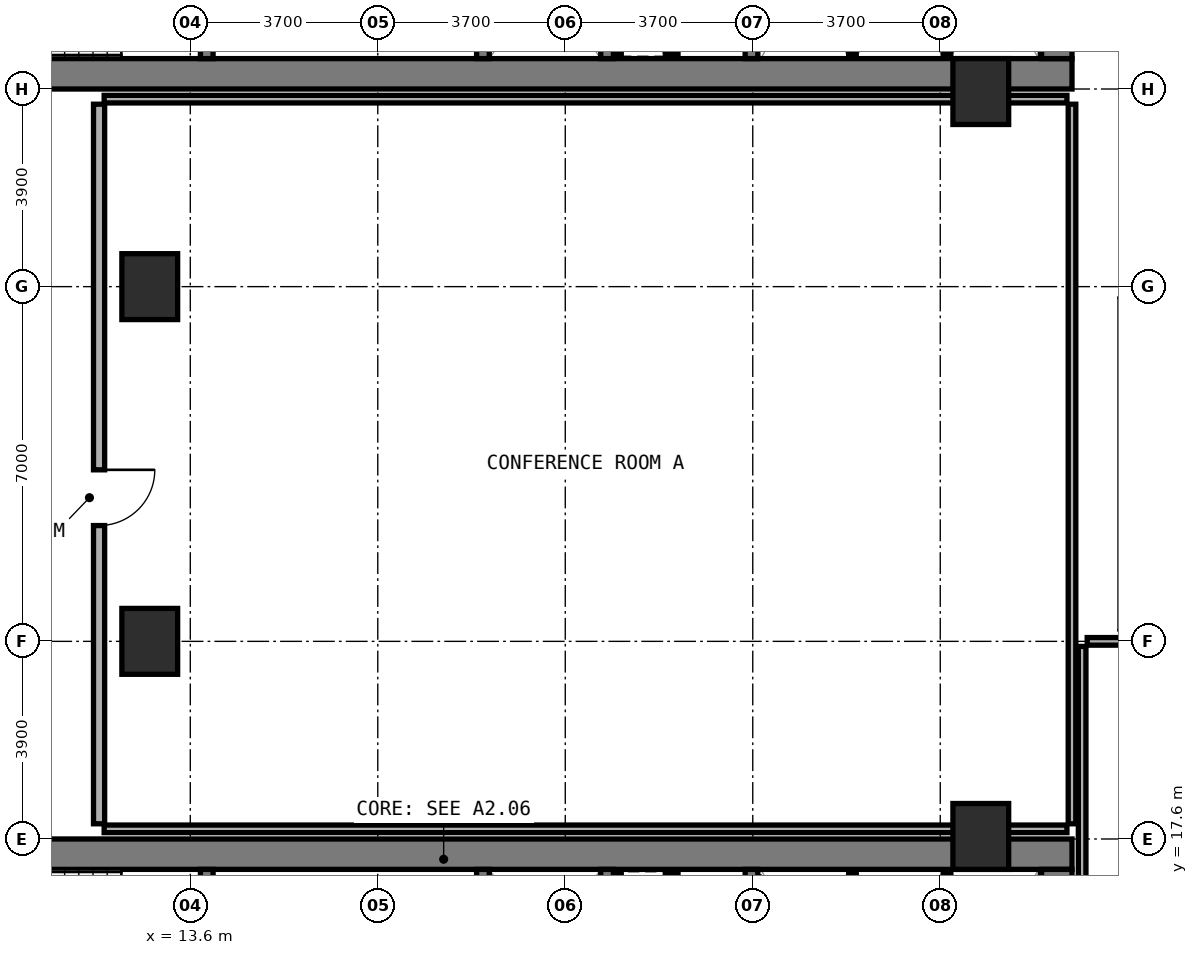
"""IFC4 building model, lengths in metres.
Left out: names, types, materials, properties, quantities, classifications, styles, units other than length and angle.
Written with IfcOpenShell. Run it as: python <this file> out.ifc"""

import sys

from ifc_helpers import new_model, si_unit, direction, frame, frame_2d, origin, origin_2d, place, context, subcontext, project, spatial, rectangle, extrude, element, fill, save


model = new_model("IFC4")
c1 = context("Model", 3, precision=1e-05, world=origin(), true_north=direction((0.0, 1.0)))
c2 = subcontext(c1, "Body", "Model", "MODEL_VIEW")
j1 = project(units=[si_unit("LENGTHUNIT", "METRE"), si_unit("PLANEANGLEUNIT", "RADIAN")], contexts=[c1])
p1 = place(None, origin())
s1 = spatial("IfcSite", under=j1, at=p1, CompositionType="ELEMENT")
p2 = place(p1, origin())
s2 = spatial("IfcBuilding", under=s1, at=p2, CompositionType="ELEMENT")
p3 = place(p2, frame((0.0, 0.0, 15.0)))
s3 = spatial("IfcBuildingStorey", under=s2, at=p3, CompositionType="ELEMENT", Elevation=15.0)
p4 = place(p3, frame((6.2, 32.7, 0.0), z_axis=(0.0, 0.0, 1.0), x_axis=(1.0, 0.0, 0.0)))
e1 = element("IfcWall", 1, at=p4, inside=s3, PredefinedType="SHEAR", context=c2, shape_type="SweptSolid", body=[
    extrude(rectangle(XDim=24.8, YDim=0.6, at=frame_2d((12.4, 0.0))), origin(), (0.0, 0.0, 1.0), 4.5),
])
p5 = place(p3, frame((30.7, 33.0, 0.0), z_axis=(0.0, 0.0, 1.0), x_axis=(0.0, 1.0, 0.0)))
e2 = element("IfcWall", 2, at=p5, inside=s3, PredefinedType="SHEAR", context=c2, shape_type="SweptSolid", body=[
    extrude(rectangle(XDim=3.16, YDim=0.6, at=frame_2d((1.58, 0.0))), origin(), (0.0, 0.0, 1.0), 4.5),
])
p6 = place(p3, frame((13.925, 33.0, 0.0), z_axis=(0.0, 0.0, 1.0), x_axis=(0.0, 1.0, 0.0)))
e3 = element("IfcWall", 3, at=p6, inside=s3, PredefinedType="STANDARD", context=c2, shape_type="SweptSolid", body=[
    extrude(rectangle(XDim=3.16, YDim=0.25, at=frame_2d((1.58, 0.0))), origin(), (0.0, 0.0, 1.0), 4.1),
])
p7 = place(p6, frame((0.98, 0.0, 0.0)))
e4 = element("IfcOpeningElement", 4, at=p7, cuts=e3, PredefinedType="OPENING", context=c2, shape_type="SweptSolid", body=[
    extrude(rectangle(XDim=1.1, YDim=2.15, at=frame_2d((0.55, 1.075))), frame((0.0, 0.135, 0.0), z_axis=(0.0, -1.0, 0.0), x_axis=(1.0, 0.0, 0.0)), (0.0, 0.0, 1.0), 0.27),
])
p8 = place(p3, frame((19.375, 33.0, 0.0), z_axis=(0.0, 0.0, 1.0), x_axis=(0.0, 1.0, 0.0)))
e5 = element("IfcWall", 5, at=p8, inside=s3, PredefinedType="STANDARD", context=c2, shape_type="SweptSolid", body=[
    extrude(rectangle(XDim=3.16, YDim=0.25, at=frame_2d((1.58, 0.0))), origin(), (0.0, 0.0, 1.0), 4.1),
])
p9 = place(p8, frame((0.98, 0.0, 0.0)))
e6 = element("IfcOpeningElement", 6, at=p9, cuts=e5, PredefinedType="OPENING", context=c2, shape_type="SweptSolid", body=[
    extrude(rectangle(XDim=1.1, YDim=2.15, at=frame_2d((0.55, 1.075))), frame((0.0, 0.135, 0.0), z_axis=(0.0, -1.0, 0.0), x_axis=(1.0, 0.0, 0.0)), (0.0, 0.0, 1.0), 0.27),
])
for number, where, z_axis, x_axis in (
    (7, (21.825, 33.0, 0.0), (0.0, 0.0, 1.0), (0.0, 1.0, 0.0)),
    (8, (24.675, 33.0, 0.0), (0.0, 0.0, 1.0), (0.0, 1.0, 0.0)),
):
    element("IfcWall", number, at=place(p3, frame(where, z_axis=z_axis, x_axis=x_axis)), inside=s3, PredefinedType="STANDARD", context=c2, shape_type="SweptSolid", body=[
        extrude(rectangle(XDim=3.16, YDim=0.25, at=frame_2d((1.58, 0.0))), origin(), (0.0, 0.0, 1.0), 4.1),
    ])
p10 = place(p3, frame((6.2, 17.3, 0.0), z_axis=(0.0, 0.0, 1.0), x_axis=(1.0, 0.0, 0.0)))
e9 = element("IfcWall", 9, at=p10, inside=s3, PredefinedType="SHEAR", context=c2, shape_type="SweptSolid", body=[
    extrude(rectangle(XDim=24.8, YDim=0.6, at=frame_2d((12.4, 0.0))), origin(), (0.0, 0.0, 1.0), 4.5),
])
p11 = place(p3, frame((30.7, 13.84, 0.0), z_axis=(0.0, 0.0, 1.0), x_axis=(0.0, 1.0, 0.0)))
e10 = element("IfcWall", 10, at=p11, inside=s3, PredefinedType="SHEAR", context=c2, shape_type="SweptSolid", body=[
    extrude(rectangle(XDim=3.16, YDim=0.6, at=frame_2d((1.58, 0.0))), origin(), (0.0, 0.0, 1.0), 4.5),
])
p12 = place(p3, frame((13.925, 13.84, 0.0), z_axis=(0.0, 0.0, 1.0), x_axis=(0.0, 1.0, 0.0)))
e11 = element("IfcWall", 11, at=p12, inside=s3, PredefinedType="STANDARD", context=c2, shape_type="SweptSolid", body=[
    extrude(rectangle(XDim=3.16, YDim=0.25, at=frame_2d((1.58, 0.0))), origin(), (0.0, 0.0, 1.0), 4.1),
])
p13 = place(p12, frame((0.98, 0.0, 0.0)))
e12 = element("IfcOpeningElement", 12, at=p13, cuts=e11, PredefinedType="OPENING", context=c2, shape_type="SweptSolid", body=[
    extrude(rectangle(XDim=1.1, YDim=2.15, at=frame_2d((0.55, 1.075))), frame((0.0, 0.135, 0.0), z_axis=(0.0, -1.0, 0.0), x_axis=(1.0, 0.0, 0.0)), (0.0, 0.0, 1.0), 0.27),
])
p14 = place(p3, frame((19.375, 13.84, 0.0), z_axis=(0.0, 0.0, 1.0), x_axis=(0.0, 1.0, 0.0)))
e13 = element("IfcWall", 13, at=p14, inside=s3, PredefinedType="STANDARD", context=c2, shape_type="SweptSolid", body=[
    extrude(rectangle(XDim=3.16, YDim=0.25, at=frame_2d((1.58, 0.0))), origin(), (0.0, 0.0, 1.0), 4.1),
])
p15 = place(p14, frame((0.98, 0.0, 0.0)))
e14 = element("IfcOpeningElement", 14, at=p15, cuts=e13, PredefinedType="OPENING", context=c2, shape_type="SweptSolid", body=[
    extrude(rectangle(XDim=1.1, YDim=2.15, at=frame_2d((0.55, 1.075))), frame((0.0, 0.135, 0.0), z_axis=(0.0, -1.0, 0.0), x_axis=(1.0, 0.0, 0.0)), (0.0, 0.0, 1.0), 0.27),
])
for number, where, z_axis, x_axis in (
    (15, (21.825, 13.84, 0.0), (0.0, 0.0, 1.0), (0.0, 1.0, 0.0)),
    (16, (24.675, 13.84, 0.0), (0.0, 0.0, 1.0), (0.0, 1.0, 0.0)),
):
    element("IfcWall", number, at=place(p3, frame(where, z_axis=z_axis, x_axis=x_axis)), inside=s3, PredefinedType="STANDARD", context=c2, shape_type="SweptSolid", body=[
        extrude(rectangle(XDim=3.16, YDim=0.25, at=frame_2d((1.58, 0.0))), origin(), (0.0, 0.0, 1.0), 4.1),
    ])
for number, where, z_axis, x_axis in (
    (17, (12.8, 21.5, 0.0), (0.0, 0.0, 1.0), (1.0, 0.0, 0.0)),
    (18, (12.8, 28.5, 0.0), (0.0, 0.0, 1.0), (1.0, 0.0, 0.0)),
    (19, (29.2, 17.65, 0.0), (0.0, 0.0, 1.0), (1.0, 0.0, 0.0)),
    (20, (29.2, 32.35, 0.0), (0.0, 0.0, 1.0), (1.0, 0.0, 0.0)),
):
    element("IfcColumn", number, at=place(p3, frame(where, z_axis=z_axis, x_axis=x_axis)), inside=s3, PredefinedType="COLUMN", context=c2, shape_type="SweptSolid", body=[
        extrude(rectangle(XDim=1.1, YDim=1.3, at=origin_2d()), origin(), (0.0, 0.0, 1.0), 4.5),
    ])
p16 = place(p3, frame((22.03, 33.1, 0.0), z_axis=(0.0, 0.0, 1.0), x_axis=(0.0, 1.0, 0.0)))
e21 = element("IfcWall", 21, at=p16, inside=s3, PredefinedType="PARTITIONING", context=c2, shape_type="SweptSolid", body=[
    extrude(rectangle(XDim=1.62, YDim=0.15, at=frame_2d((0.81, 0.0))), origin(), (0.0, 0.0, 1.0), 4.1),
])
p17 = place(p3, frame((23.1, 33.1, 0.0), z_axis=(0.0, 0.0, 1.0), x_axis=(0.0, 1.0, 0.0)))
e22 = element("IfcWall", 22, at=p17, inside=s3, PredefinedType="SOLIDWALL", context=c2, shape_type="SweptSolid", body=[
    extrude(rectangle(XDim=1.62, YDim=0.25, at=frame_2d((0.81, 0.0))), origin(), (0.0, 0.0, 1.0), 4.1),
])
p18 = place(p3, frame((26.667, 33.1, 0.0), z_axis=(0.0, 0.0, 1.0), x_axis=(0.0, 1.0, 0.0)))
e23 = element("IfcWall", 23, at=p18, inside=s3, PredefinedType="PARTITIONING", context=c2, shape_type="SweptSolid", body=[
    extrude(rectangle(XDim=2.96, YDim=0.15, at=frame_2d((1.48, 0.0))), origin(), (0.0, 0.0, 1.0), 4.1),
])
p19 = place(p3, frame((28.533, 33.1, 0.0), z_axis=(0.0, 0.0, 1.0), x_axis=(0.0, 1.0, 0.0)))
e24 = element("IfcWall", 24, at=p19, inside=s3, PredefinedType="PARTITIONING", context=c2, shape_type="SweptSolid", body=[
    extrude(rectangle(XDim=2.96, YDim=0.15, at=frame_2d((1.48, 0.0))), origin(), (0.0, 0.0, 1.0), 3.175),
])
p20 = place(p3, frame((22.03, 15.28, 0.0), z_axis=(0.0, 0.0, 1.0), x_axis=(0.0, 1.0, 0.0)))
e25 = element("IfcWall", 25, at=p20, inside=s3, PredefinedType="PARTITIONING", context=c2, shape_type="SweptSolid", body=[
    extrude(rectangle(XDim=1.62, YDim=0.15, at=frame_2d((0.81, 0.0))), origin(), (0.0, 0.0, 1.0), 4.1),
])
p21 = place(p3, frame((23.1, 15.28, 0.0), z_axis=(0.0, 0.0, 1.0), x_axis=(0.0, 1.0, 0.0)))
e26 = element("IfcWall", 26, at=p21, inside=s3, PredefinedType="SOLIDWALL", context=c2, shape_type="SweptSolid", body=[
    extrude(rectangle(XDim=1.62, YDim=0.25, at=frame_2d((0.81, 0.0))), origin(), (0.0, 0.0, 1.0), 4.1),
])
p22 = place(p3, frame((26.667, 13.94, 0.0), z_axis=(0.0, 0.0, 1.0), x_axis=(0.0, 1.0, 0.0)))
e27 = element("IfcWall", 27, at=p22, inside=s3, PredefinedType="PARTITIONING", context=c2, shape_type="SweptSolid", body=[
    extrude(rectangle(XDim=2.96, YDim=0.15, at=frame_2d((1.48, 0.0))), origin(), (0.0, 0.0, 1.0), 4.1),
])
p23 = place(p3, frame((28.533, 13.94, 0.0), z_axis=(0.0, 0.0, 1.0), x_axis=(0.0, 1.0, 0.0)))
e28 = element("IfcWall", 28, at=p23, inside=s3, PredefinedType="PARTITIONING", context=c2, shape_type="SweptSolid", body=[
    extrude(rectangle(XDim=2.96, YDim=0.15, at=frame_2d((1.48, 0.0))), origin(), (0.0, 0.0, 1.0), 3.175),
])
p24 = place(p3, frame((31.0, 17.9, 0.0), z_axis=(0.0, 0.0, 1.0), x_axis=(0.0, 1.0, 0.0)))
e29 = element("IfcWall", 29, at=p24, inside=s3, PredefinedType="PARTITIONING", context=c2, shape_type="SweptSolid", body=[
    extrude(rectangle(XDim=14.2, YDim=0.15, at=frame_2d((7.1, 0.0))), origin(), (0.0, 0.0, 1.0), 3.175),
])
for number, where, z_axis, x_axis in (
    (30, (11.9, 17.8, 0.0), (0.0, 0.0, 1.0), (1.0, 0.0, 0.0)),
    (31, (11.9, 32.2, 0.0), (0.0, 0.0, 1.0), (1.0, 0.0, 0.0)),
):
    element("IfcWall", number, at=place(p3, frame(where, z_axis=z_axis, x_axis=x_axis)), inside=s3, PredefinedType="PARTITIONING", context=c2, shape_type="SweptSolid", body=[
        extrude(rectangle(XDim=19.0, YDim=0.15, at=frame_2d((9.5, 0.0))), origin(), (0.0, 0.0, 1.0), 3.175),
    ])
p25 = place(p3, frame((11.8, 17.9, 0.0), z_axis=(0.0, 0.0, 1.0), x_axis=(0.0, 1.0, 0.0)))
e32 = element("IfcWall", 32, at=p25, inside=s3, PredefinedType="SOLIDWALL", context=c2, shape_type="SweptSolid", body=[
    extrude(rectangle(XDim=14.2, YDim=0.22, at=frame_2d((7.1, 0.0))), origin(), (0.0, 0.0, 1.0), 3.175),
])
p26 = place(p25, frame((5.885, 0.0, 0.0)))
e33 = element("IfcOpeningElement", 33, at=p26, cuts=e32, PredefinedType="OPENING", context=c2, shape_type="SweptSolid", body=[
    extrude(rectangle(XDim=1.1, YDim=2.1, at=frame_2d((0.55, 1.05))), frame((0.0, 0.12, 0.0), z_axis=(0.0, -1.0, 0.0), x_axis=(1.0, 0.0, 0.0)), (0.0, 0.0, 1.0), 0.24),
])
p27 = place(p3, frame((31.2, 13.5, 0.0), z_axis=(0.0, 0.0, 1.0), x_axis=(0.0, 1.0, 0.0)))
e34 = element("IfcWall", 34, at=p27, inside=s3, PredefinedType="PARTITIONING", context=c2, shape_type="SweptSolid", body=[
    extrude(rectangle(XDim=7.9, YDim=0.15, at=frame_2d((3.95, 0.0))), origin(), (0.0, 0.0, 1.0), 3.175),
])
p28 = place(p3, frame((31.3, 21.5, 0.0), z_axis=(0.0, 0.0, 1.0), x_axis=(1.0, 0.0, 0.0)))
e35 = element("IfcWall", 35, at=p28, inside=s3, PredefinedType="PARTITIONING", context=c2, shape_type="SweptSolid", body=[
    extrude(rectangle(XDim=7.15, YDim=0.15, at=frame_2d((3.575, 0.0))), origin(), (0.0, 0.0, 1.0), 3.175),
])
p29 = place(p26, frame((1.1, 0.0, 0.0), z_axis=(0.0, 0.0, 1.0), x_axis=(-1.0, 0.0, 0.0)))
e36 = element("IfcDoor", 36, at=p29, inside=s3, OperationType="SINGLE_SWING_LEFT", PredefinedType="DOOR", context=c2, shape_type="SweptSolid", body=[
    extrude(rectangle(XDim=1.1, YDim=2.1, at=frame_2d((0.55, 1.05))), frame((0.0, 0.025, 0.0), z_axis=(0.0, -1.0, 0.0), x_axis=(1.0, 0.0, 0.0)), (0.0, 0.0, 1.0), 0.05),
])
fill(e33, e36)
save(model, sys.argv[1])
